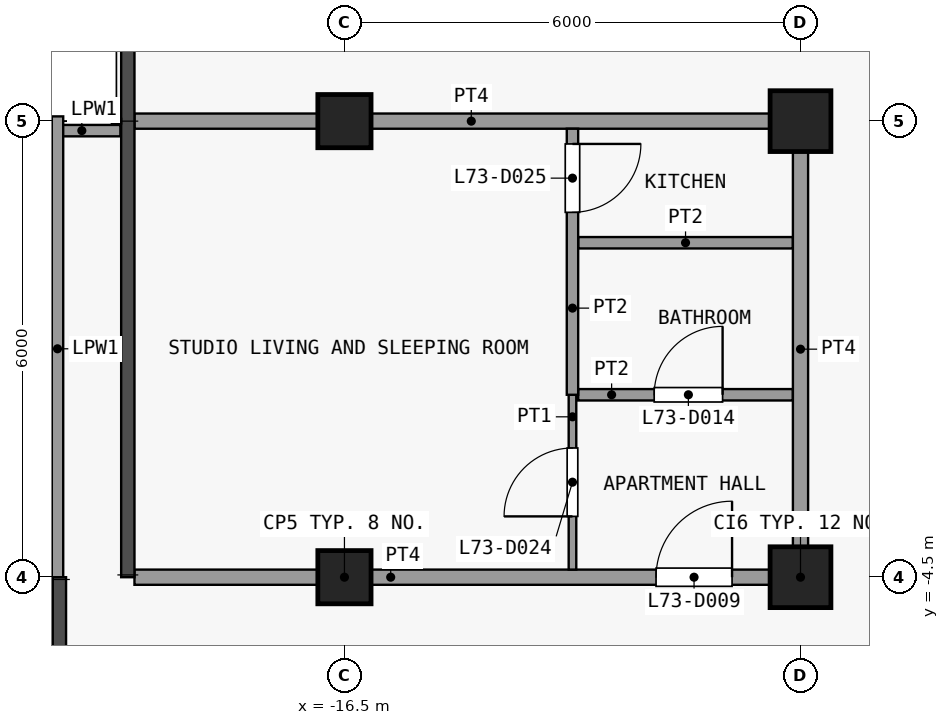
"""IFC4 building model, lengths in metres.
Left out: names, types, materials, properties, quantities, classifications, styles, units other than length and angle.
Written with IfcOpenShell. Run it as: python <this file> out.ifc"""

import sys

from ifc_helpers import new_model, si_unit, direction, frame, frame_2d, origin, origin_2d, place, context, subcontext, project, spatial, rectangle, extrude, element, fill, save


model = new_model("IFC4")
c1 = context("Model", 3, precision=1e-05, world=origin(), true_north=direction((0.0, 1.0)))
c2 = subcontext(c1, "Body", "Model", "MODEL_VIEW")
j1 = project(units=[si_unit("LENGTHUNIT", "METRE"), si_unit("PLANEANGLEUNIT", "RADIAN")], contexts=[c1])
p1 = place(None, origin())
s1 = spatial("IfcSite", under=j1, at=p1, CompositionType="ELEMENT")
p2 = place(p1, origin())
s2 = spatial("IfcBuilding", under=s1, at=p2, CompositionType="ELEMENT")
p3 = place(p2, frame((0.0, 0.0, 287.9)))
s3 = spatial("IfcBuildingStorey", under=s2, at=p3, CompositionType="ELEMENT", Elevation=287.9)
for number, where, z_axis, x_axis in (
    (1, (-16.5, -4.5, 0.0), (0.0, 0.0, 1.0), (1.0, 0.0, 0.0)),
    (2, (-16.5, 1.5, 0.0), (0.0, 0.0, 1.0), (1.0, 0.0, 0.0)),
):
    element("IfcColumn", number, at=place(p3, frame(where, z_axis=z_axis, x_axis=x_axis)), inside=s3, PredefinedType="COLUMN", context=c2, shape_type="SweptSolid", body=[
        extrude(rectangle(XDim=0.7, YDim=0.7, at=origin_2d()), origin(), (0.0, 0.0, 1.0), 3.6),
    ])
for number, where, z_axis, x_axis in (
    (3, (-10.5, -4.5, 0.0), (0.0, 0.0, 1.0), (1.0, 0.0, 0.0)),
    (4, (-10.5, 1.5, 0.0), (0.0, 0.0, 1.0), (1.0, 0.0, 0.0)),
):
    element("IfcColumn", number, at=place(p3, frame(where, z_axis=z_axis, x_axis=x_axis)), inside=s3, PredefinedType="COLUMN", context=c2, shape_type="SweptSolid", body=[
        extrude(rectangle(XDim=0.8, YDim=0.8, at=origin_2d()), origin(), (0.0, 0.0, 1.0), 3.6),
    ])
p4 = place(p3, frame((-20.462, 1.375, 0.0), z_axis=(0.0, 0.0, 1.0), x_axis=(1.0, 0.0, 0.0)))
e5 = element("IfcWall", 5, at=p4, inside=s3, PredefinedType="PARAPET", context=c2, shape_type="SweptSolid", body=[
    extrude(rectangle(XDim=1.015, YDim=0.15, at=frame_2d((0.507, 0.0))), origin(), (0.0, 0.0, 1.0), 1.15),
])
p5 = place(p3, frame((-20.275, -4.552, 0.0), z_axis=(0.0, 0.0, 1.0), x_axis=(0.0, 1.0, 0.0)))
e6 = element("IfcWall", 6, at=p5, inside=s3, PredefinedType="PARAPET", context=c2, shape_type="SweptSolid", body=[
    extrude(rectangle(XDim=6.115, YDim=0.15, at=frame_2d((3.058, 0.0))), origin(), (0.0, 0.0, 1.0), 1.15),
])
p6 = place(p3, frame((-19.262, -4.5, 0.0), z_axis=(0.0, 0.0, 1.0), x_axis=(1.0, 0.0, 0.0)))
e7 = element("IfcWall", 7, at=p6, inside=s3, PredefinedType="PARTITIONING", context=c2, shape_type="SweptSolid", body=[
    extrude(rectangle(XDim=8.863, YDim=0.2, at=frame_2d((4.431, 0.0))), origin(), (0.0, 0.0, 1.0), 3.3),
])
p7 = place(p6, frame((6.862, 0.0, 0.0)))
e8 = element("IfcOpeningElement", 8, at=p7, cuts=e7, PredefinedType="OPENING", context=c2, shape_type="SweptSolid", body=[
    extrude(rectangle(XDim=1.0, YDim=2.1, at=frame_2d((0.5, 1.05))), frame((0.0, 0.11, 0.0), z_axis=(0.0, -1.0, 0.0), x_axis=(1.0, 0.0, 0.0)), (0.0, 0.0, 1.0), 0.22),
])
p8 = place(p3, frame((-13.425, -2.1, 0.0), z_axis=(0.0, 0.0, 1.0), x_axis=(1.0, 0.0, 0.0)))
e9 = element("IfcWall", 9, at=p8, inside=s3, PredefinedType="PARTITIONING", context=c2, shape_type="SweptSolid", body=[
    extrude(rectangle(XDim=2.825, YDim=0.15, at=frame_2d((1.413, 0.0))), origin(), (0.0, 0.0, 1.0), 3.3),
])
p9 = place(p8, frame((1.0, 0.0, 0.0)))
e10 = element("IfcOpeningElement", 10, at=p9, cuts=e9, PredefinedType="OPENING", context=c2, shape_type="SweptSolid", body=[
    extrude(rectangle(XDim=0.9, YDim=2.1, at=frame_2d((0.45, 1.05))), frame((0.0, 0.085, 0.0), z_axis=(0.0, -1.0, 0.0), x_axis=(1.0, 0.0, 0.0)), (0.0, 0.0, 1.0), 0.17),
])
p10 = place(p3, frame((-13.425, -0.1, 0.0), z_axis=(0.0, 0.0, 1.0), x_axis=(1.0, 0.0, 0.0)))
e11 = element("IfcWall", 11, at=p10, inside=s3, PredefinedType="PARTITIONING", context=c2, shape_type="SweptSolid", body=[
    extrude(rectangle(XDim=2.825, YDim=0.15, at=frame_2d((1.413, 0.0))), origin(), (0.0, 0.0, 1.0), 3.3),
])
p11 = place(p3, frame((-19.262, 1.5, 0.0), z_axis=(0.0, 0.0, 1.0), x_axis=(1.0, 0.0, 0.0)))
e12 = element("IfcWall", 12, at=p11, inside=s3, PredefinedType="PARTITIONING", context=c2, shape_type="SweptSolid", body=[
    extrude(rectangle(XDim=8.863, YDim=0.2, at=frame_2d((4.431, 0.0))), origin(), (0.0, 0.0, 1.0), 3.3),
])
p12 = place(p3, frame((-13.5, -4.4, 0.0), z_axis=(0.0, 0.0, 1.0), x_axis=(0.0, 1.0, 0.0)))
e13 = element("IfcWall", 13, at=p12, inside=s3, PredefinedType="PARTITIONING", context=c2, shape_type="SweptSolid", body=[
    extrude(rectangle(XDim=2.3, YDim=0.1, at=frame_2d((1.15, 0.0))), origin(), (0.0, 0.0, 1.0), 3.3),
])
p13 = place(p12, frame((0.7, 0.0, 0.0)))
e14 = element("IfcOpeningElement", 14, at=p13, cuts=e13, PredefinedType="OPENING", context=c2, shape_type="SweptSolid", body=[
    extrude(rectangle(XDim=0.9, YDim=2.1, at=frame_2d((0.45, 1.05))), frame((0.0, 0.06, 0.0), z_axis=(0.0, -1.0, 0.0), x_axis=(1.0, 0.0, 0.0)), (0.0, 0.0, 1.0), 0.12),
])
p14 = place(p3, frame((-13.5, -2.1, 0.0), z_axis=(0.0, 0.0, 1.0), x_axis=(0.0, 1.0, 0.0)))
e15 = element("IfcWall", 15, at=p14, inside=s3, PredefinedType="PARTITIONING", context=c2, shape_type="SweptSolid", body=[
    extrude(rectangle(XDim=3.5, YDim=0.15, at=frame_2d((1.75, 0.0))), origin(), (0.0, 0.0, 1.0), 3.3),
])
p15 = place(p14, frame((2.4, 0.0, 0.0)))
e16 = element("IfcOpeningElement", 16, at=p15, cuts=e15, PredefinedType="OPENING", context=c2, shape_type="SweptSolid", body=[
    extrude(rectangle(XDim=0.9, YDim=2.1, at=frame_2d((0.45, 1.05))), frame((0.0, 0.085, 0.0), z_axis=(0.0, -1.0, 0.0), x_axis=(1.0, 0.0, 0.0)), (0.0, 0.0, 1.0), 0.17),
])
p16 = place(p3, frame((-10.5, -4.4, 0.0), z_axis=(0.0, 0.0, 1.0), x_axis=(0.0, 1.0, 0.0)))
e17 = element("IfcWall", 17, at=p16, inside=s3, PredefinedType="PARTITIONING", context=c2, shape_type="SweptSolid", body=[
    extrude(rectangle(XDim=5.8, YDim=0.2, at=frame_2d((2.9, 0.0))), origin(), (0.0, 0.0, 1.0), 3.3),
])
p17 = place(p7, origin())
e18 = element("IfcDoor", 18, at=p17, inside=s3, OperationType="SINGLE_SWING_LEFT", PredefinedType="DOOR", context=c2, shape_type="SweptSolid", body=[
    extrude(rectangle(XDim=1.0, YDim=2.1, at=frame_2d((0.5, 1.05))), frame((0.0, 0.025, 0.0), z_axis=(0.0, -1.0, 0.0), x_axis=(1.0, 0.0, 0.0)), (0.0, 0.0, 1.0), 0.05),
])
fill(e8, e18)
p18 = place(p9, origin())
e19 = element("IfcDoor", 19, at=p18, inside=s3, OperationType="SINGLE_SWING_LEFT", PredefinedType="DOOR", context=c2, shape_type="SweptSolid", body=[
    extrude(rectangle(XDim=0.9, YDim=2.1, at=frame_2d((0.45, 1.05))), frame((0.0, 0.025, 0.0), z_axis=(0.0, -1.0, 0.0), x_axis=(1.0, 0.0, 0.0)), (0.0, 0.0, 1.0), 0.05),
])
fill(e10, e19)
p19 = place(p13, origin())
e20 = element("IfcDoor", 20, at=p19, inside=s3, OperationType="SINGLE_SWING_RIGHT", PredefinedType="DOOR", context=c2, shape_type="SweptSolid", body=[
    extrude(rectangle(XDim=0.9, YDim=2.1, at=frame_2d((0.45, 1.05))), frame((0.0, 0.025, 0.0), z_axis=(0.0, -1.0, 0.0), x_axis=(1.0, 0.0, 0.0)), (0.0, 0.0, 1.0), 0.05),
])
fill(e14, e20)
p20 = place(p15, origin())
e21 = element("IfcDoor", 21, at=p20, inside=s3, OperationType="SINGLE_SWING_RIGHT", PredefinedType="DOOR", context=c2, shape_type="SweptSolid", body=[
    extrude(rectangle(XDim=0.9, YDim=2.1, at=frame_2d((0.45, 1.05))), frame((0.0, 0.025, 0.0), z_axis=(0.0, -1.0, 0.0), x_axis=(1.0, 0.0, 0.0)), (0.0, 0.0, 1.0), 0.05),
])
fill(e16, e21)
save(model, sys.argv[1])
